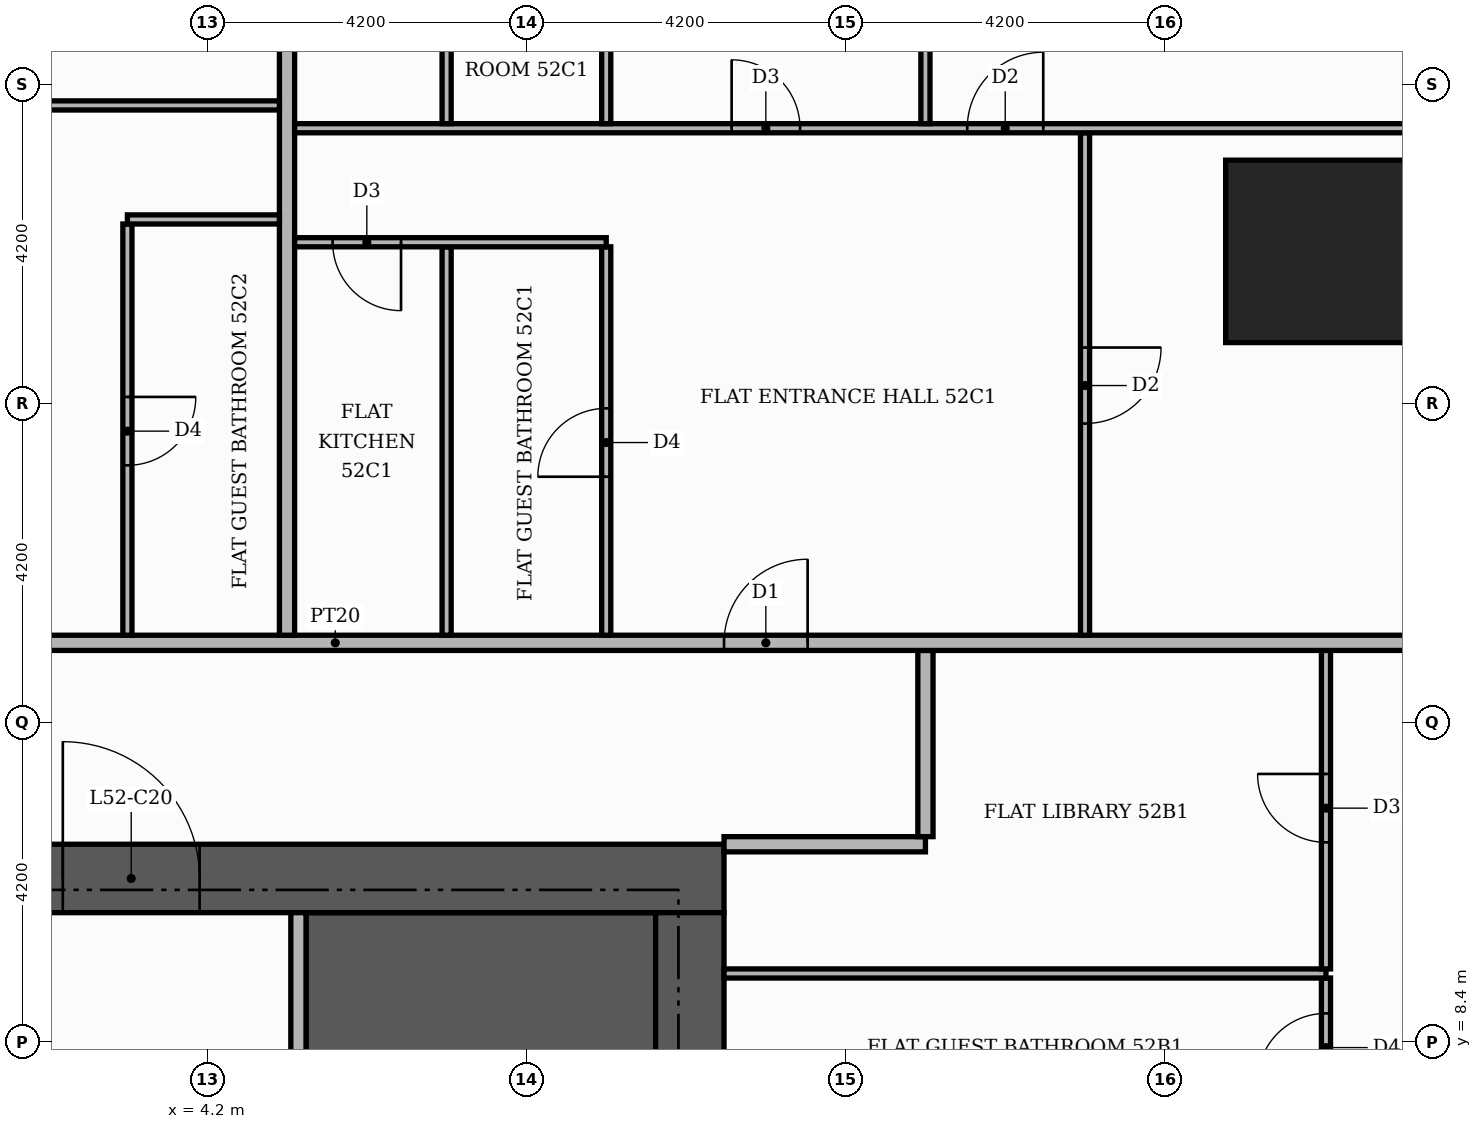
"""IFC4 building model, lengths in metres.
Left out: names, types, materials, properties, quantities, classifications, styles, units other than length and angle.
Written with IfcOpenShell. Run it as: python <this file> out.ifc"""

import sys

from ifc_helpers import new_model, si_unit, direction, frame, frame_2d, origin, origin_2d, place, context, subcontext, project, spatial, rectangle, extrude, element, fill, save


model = new_model("IFC4")
c1 = context("Model", 3, precision=1e-05, world=origin(), true_north=direction((0.0, 1.0)))
c2 = subcontext(c1, "Body", "Model", "MODEL_VIEW")
j1 = project(units=[si_unit("LENGTHUNIT", "METRE"), si_unit("PLANEANGLEUNIT", "RADIAN")], contexts=[c1])
p1 = place(None, origin())
s1 = spatial("IfcSite", under=j1, at=p1, CompositionType="ELEMENT")
p2 = place(p1, origin())
s2 = spatial("IfcBuilding", under=s1, at=p2, CompositionType="ELEMENT")
p3 = place(p2, frame((0.0, 0.0, 219.6)))
s3 = spatial("IfcBuildingStorey", under=s2, at=p3, CompositionType="ELEMENT", Elevation=219.6)
p4 = place(p3, frame((5.5, 9.15, 0.0), z_axis=(0.0, 0.0, 1.0), x_axis=(1.0, 0.0, 0.0)))
e1 = element("IfcWall", 1, at=p4, inside=s3, PredefinedType="SHEAR", context=c2, shape_type="SweptSolid", body=[
    extrude(rectangle(XDim=4.6, YDim=1.9, at=frame_2d((2.3, 0.0))), origin(), (0.0, 0.0, 1.0), 3.48),
])
p5 = place(p3, frame((-11.0, 10.55, 0.0), z_axis=(0.0, 0.0, 1.0), x_axis=(1.0, 0.0, 0.0)))
e2 = element("IfcWall", 2, at=p5, inside=s3, PredefinedType="SHEAR", context=c2, shape_type="SweptSolid", body=[
    extrude(rectangle(XDim=22.0, YDim=0.9, at=frame_2d((11.0, 0.0))), origin(), (0.0, 0.0, 1.0), 3.48),
])
p6 = place(p5, frame((13.3, 0.0, 0.0)))
e3 = element("IfcOpeningElement", 3, at=p6, cuts=e2, PredefinedType="OPENING", context=c2, shape_type="SweptSolid", body=[
    extrude(rectangle(XDim=1.8, YDim=2.2, at=frame_2d((0.9, 1.1))), frame((0.0, 0.46, 0.0), z_axis=(0.0, -1.0, 0.0), x_axis=(1.0, 0.0, 0.0)), (0.0, 0.0, 1.0), 0.92),
])
p7 = place(p3, frame((10.55, -10.1, 0.0), z_axis=(0.0, 0.0, 1.0), x_axis=(0.0, 1.0, 0.0)))
e4 = element("IfcWall", 4, at=p7, inside=s3, PredefinedType="SHEAR", context=c2, shape_type="SweptSolid", body=[
    extrude(rectangle(XDim=20.2, YDim=0.9, at=frame_2d((10.1, 0.0))), origin(), (0.0, 0.0, 1.0), 3.48),
])
p8 = place(p3, frame((18.8, 18.8, 0.0), z_axis=(0.0, 0.0, 1.0), x_axis=(1.0, 0.0, 0.0)))
e5 = element("IfcColumn", 5, at=p8, inside=s3, PredefinedType="COLUMN", context=c2, shape_type="SweptSolid", body=[
    extrude(rectangle(XDim=2.4, YDim=2.4, at=origin_2d()), origin(), (0.0, 0.0, 1.0), 3.9),
])
p9 = place(p3, frame((5.4, 5.5, 0.0), z_axis=(0.0, 0.0, 1.0), x_axis=(0.0, 1.0, 0.0)))
e6 = element("IfcWall", 6, at=p9, inside=s3, PredefinedType="PARTITIONING", context=c2, shape_type="SweptSolid", body=[
    extrude(rectangle(XDim=4.6, YDim=0.2, at=frame_2d((2.3, 0.0))), origin(), (0.0, 0.0, 1.0), 3.48),
])
p10 = place(p9, frame((0.25, 0.0, 0.0)))
e7 = element("IfcOpeningElement", 7, at=p10, cuts=e6, PredefinedType="OPENING", context=c2, shape_type="SweptSolid", body=[
    extrude(rectangle(XDim=1.0, YDim=2.1, at=frame_2d((0.5, 1.05))), frame((0.0, 0.11, 0.0), z_axis=(0.0, -1.0, 0.0), x_axis=(1.0, 0.0, 0.0)), (0.0, 0.0, 1.0), 0.22),
])
p11 = place(p3, frame((18.92, 7.41, 0.0), z_axis=(0.0, 0.0, 1.0), x_axis=(0.0, 1.0, 0.0)))
e8 = element("IfcWall", 8, at=p11, inside=s3, PredefinedType="PARTITIONING", context=c2, shape_type="SweptSolid", body=[
    extrude(rectangle(XDim=1.83, YDim=0.12, at=frame_2d((0.915, 0.0))), origin(), (0.0, 0.0, 1.0), 3.48),
])
p12 = place(p11, frame((0.465, 0.0, 0.0)))
e9 = element("IfcOpeningElement", 9, at=p12, cuts=e8, PredefinedType="OPENING", context=c2, shape_type="SweptSolid", body=[
    extrude(rectangle(XDim=0.9, YDim=2.1, at=frame_2d((0.45, 1.05))), frame((0.0, 0.07, 0.0), z_axis=(0.0, -1.0, 0.0), x_axis=(1.0, 0.0, 0.0)), (0.0, 0.0, 1.0), 0.14),
])
p13 = place(p3, frame((11.0, 9.3, 0.0), z_axis=(0.0, 0.0, 1.0), x_axis=(1.0, 0.0, 0.0)))
e10 = element("IfcWall", 10, at=p13, inside=s3, PredefinedType="PARTITIONING", context=c2, shape_type="SweptSolid", body=[
    extrude(rectangle(XDim=7.92, YDim=0.12, at=frame_2d((3.96, 0.0))), origin(), (0.0, 0.0, 1.0), 3.48),
])
p14 = place(p3, frame((18.92, 9.36, 0.0), z_axis=(0.0, 0.0, 1.0), x_axis=(0.0, 1.0, 0.0)))
e11 = element("IfcWall", 11, at=p14, inside=s3, PredefinedType="PARTITIONING", context=c2, shape_type="SweptSolid", body=[
    extrude(rectangle(XDim=4.19, YDim=0.12, at=frame_2d((2.095, 0.0))), origin(), (0.0, 0.0, 1.0), 3.48),
])
p15 = place(p14, frame((1.665, 0.0, 0.0)))
e12 = element("IfcOpeningElement", 12, at=p15, cuts=e11, PredefinedType="OPENING", context=c2, shape_type="SweptSolid", body=[
    extrude(rectangle(XDim=0.9, YDim=2.1, at=frame_2d((0.45, 1.05))), frame((0.0, 0.07, 0.0), z_axis=(0.0, -1.0, 0.0), x_axis=(1.0, 0.0, 0.0)), (0.0, 0.0, 1.0), 0.14),
])
p16 = place(p3, frame((11.0, 11.0, 0.0), z_axis=(0.0, 0.0, 1.0), x_axis=(1.0, 0.0, 0.0)))
e13 = element("IfcWall", 13, at=p16, inside=s3, PredefinedType="PARTITIONING", context=c2, shape_type="SweptSolid", body=[
    extrude(rectangle(XDim=2.65, YDim=0.2, at=frame_2d((1.325, 0.0))), origin(), (0.0, 0.0, 1.0), 3.48),
])
p17 = place(p3, frame((13.65, 11.1, 0.0), z_axis=(0.0, 0.0, 1.0), x_axis=(0.0, 1.0, 0.0)))
e14 = element("IfcWall", 14, at=p17, inside=s3, PredefinedType="PARTITIONING", context=c2, shape_type="SweptSolid", body=[
    extrude(rectangle(XDim=2.45, YDim=0.2, at=frame_2d((1.225, 0.0))), origin(), (0.0, 0.0, 1.0), 3.48),
])
p18 = place(p3, frame((-13.65, 13.65, 0.0), z_axis=(0.0, 0.0, 1.0), x_axis=(1.0, 0.0, 0.0)))
e15 = element("IfcWall", 15, at=p18, inside=s3, PredefinedType="PARTITIONING", context=c2, shape_type="SweptSolid", body=[
    extrude(rectangle(XDim=39.07, YDim=0.2, at=frame_2d((19.535, 0.0))), origin(), (0.0, 0.0, 1.0), 3.48),
])
p19 = place(p18, frame((24.65, 0.0, 0.0)))
e16 = element("IfcOpeningElement", 16, at=p19, cuts=e15, PredefinedType="OPENING", context=c2, shape_type="SweptSolid", body=[
    extrude(rectangle(XDim=1.1, YDim=2.4, at=frame_2d((0.55, 1.2))), frame((0.0, 0.11, 0.0), z_axis=(0.0, -1.0, 0.0), x_axis=(1.0, 0.0, 0.0)), (0.0, 0.0, 1.0), 0.22),
])
p20 = place(p18, frame((14.15, 0.0, 0.0)))
e17 = element("IfcOpeningElement", 17, at=p20, cuts=e15, PredefinedType="OPENING", context=c2, shape_type="SweptSolid", body=[
    extrude(rectangle(XDim=1.1, YDim=2.4, at=frame_2d((0.55, 1.2))), frame((0.0, 0.11, 0.0), z_axis=(0.0, -1.0, 0.0), x_axis=(1.0, 0.0, 0.0)), (0.0, 0.0, 1.0), 0.22),
])
p21 = place(p3, frame((3.15, 13.75, 0.0), z_axis=(0.0, 0.0, 1.0), x_axis=(0.0, 1.0, 0.0)))
e18 = element("IfcWall", 18, at=p21, inside=s3, PredefinedType="PARTITIONING", context=c2, shape_type="SweptSolid", body=[
    extrude(rectangle(XDim=5.41, YDim=0.12, at=frame_2d((2.705, 0.0))), origin(), (0.0, 0.0, 1.0), 3.48),
])
p22 = place(p21, frame((2.235, 0.0, 0.0)))
e19 = element("IfcOpeningElement", 19, at=p22, cuts=e18, PredefinedType="OPENING", context=c2, shape_type="SweptSolid", body=[
    extrude(rectangle(XDim=0.9, YDim=2.1, at=frame_2d((0.45, 1.05))), frame((0.0, 0.07, 0.0), z_axis=(0.0, -1.0, 0.0), x_axis=(1.0, 0.0, 0.0)), (0.0, 0.0, 1.0), 0.14),
])
p23 = place(p3, frame((5.25, 13.75, 0.0), z_axis=(0.0, 0.0, 1.0), x_axis=(0.0, 1.0, 0.0)))
e20 = element("IfcWall", 20, at=p23, inside=s3, PredefinedType="PARTITIONING", context=c2, shape_type="SweptSolid", body=[
    extrude(rectangle(XDim=11.67, YDim=0.2, at=frame_2d((5.835, 0.0))), origin(), (0.0, 0.0, 1.0), 3.48),
])
p24 = place(p3, frame((7.35, 13.75, 0.0), z_axis=(0.0, 0.0, 1.0), x_axis=(0.0, 1.0, 0.0)))
e21 = element("IfcWall", 21, at=p24, inside=s3, PredefinedType="PARTITIONING", context=c2, shape_type="SweptSolid", body=[
    extrude(rectangle(XDim=5.11, YDim=0.12, at=frame_2d((2.555, 0.0))), origin(), (0.0, 0.0, 1.0), 3.48),
])
p25 = place(p3, frame((9.45, 13.75, 0.0), z_axis=(0.0, 0.0, 1.0), x_axis=(0.0, 1.0, 0.0)))
e22 = element("IfcWall", 22, at=p25, inside=s3, PredefinedType="PARTITIONING", context=c2, shape_type="SweptSolid", body=[
    extrude(rectangle(XDim=5.11, YDim=0.12, at=frame_2d((2.555, 0.0))), origin(), (0.0, 0.0, 1.0), 3.48),
])
p26 = place(p25, frame((2.085, 0.0, 0.0)))
e23 = element("IfcOpeningElement", 23, at=p26, cuts=e22, PredefinedType="OPENING", context=c2, shape_type="SweptSolid", body=[
    extrude(rectangle(XDim=0.9, YDim=2.1, at=frame_2d((0.45, 1.05))), frame((0.0, 0.07, 0.0), z_axis=(0.0, -1.0, 0.0), x_axis=(1.0, 0.0, 0.0)), (0.0, 0.0, 1.0), 0.14),
])
p27 = place(p3, frame((15.75, 13.75, 0.0), z_axis=(0.0, 0.0, 1.0), x_axis=(0.0, 1.0, 0.0)))
e24 = element("IfcWall", 24, at=p27, inside=s3, PredefinedType="PARTITIONING", context=c2, shape_type="SweptSolid", body=[
    extrude(rectangle(XDim=6.61, YDim=0.12, at=frame_2d((3.305, 0.0))), origin(), (0.0, 0.0, 1.0), 3.48),
])
p28 = place(p27, frame((2.785, 0.0, 0.0)))
e25 = element("IfcOpeningElement", 25, at=p28, cuts=e24, PredefinedType="OPENING", context=c2, shape_type="SweptSolid", body=[
    extrude(rectangle(XDim=1.0, YDim=2.1, at=frame_2d((0.5, 1.05))), frame((0.0, 0.07, 0.0), z_axis=(0.0, -1.0, 0.0), x_axis=(1.0, 0.0, 0.0)), (0.0, 0.0, 1.0), 0.14),
])
p29 = place(p3, frame((5.35, 18.92, 0.0), z_axis=(0.0, 0.0, 1.0), x_axis=(1.0, 0.0, 0.0)))
e26 = element("IfcWall", 26, at=p29, inside=s3, PredefinedType="PARTITIONING", context=c2, shape_type="SweptSolid", body=[
    extrude(rectangle(XDim=4.1, YDim=0.12, at=frame_2d((2.05, 0.0))), origin(), (0.0, 0.0, 1.0), 3.48),
])
p30 = place(p29, frame((0.5, 0.0, 0.0)))
e27 = element("IfcOpeningElement", 27, at=p30, cuts=e26, PredefinedType="OPENING", context=c2, shape_type="SweptSolid", body=[
    extrude(rectangle(XDim=0.9, YDim=2.1, at=frame_2d((0.45, 1.05))), frame((0.0, 0.07, 0.0), z_axis=(0.0, -1.0, 0.0), x_axis=(1.0, 0.0, 0.0)), (0.0, 0.0, 1.0), 0.14),
])
p31 = place(p3, frame((3.15, 19.22, 0.0), z_axis=(0.0, 0.0, 1.0), x_axis=(1.0, 0.0, 0.0)))
e28 = element("IfcWall", 28, at=p31, inside=s3, PredefinedType="PARTITIONING", context=c2, shape_type="SweptSolid", body=[
    extrude(rectangle(XDim=2.0, YDim=0.12, at=frame_2d((1.0, 0.0))), origin(), (0.0, 0.0, 1.0), 3.48),
])
p32 = place(p3, frame((5.35, 20.42, 0.0), z_axis=(0.0, 0.0, 1.0), x_axis=(1.0, 0.0, 0.0)))
e29 = element("IfcWall", 29, at=p32, inside=s3, PredefinedType="PARTITIONING", context=c2, shape_type="SweptSolid", body=[
    extrude(rectangle(XDim=15.869, YDim=0.12, at=frame_2d((7.935, 0.0))), origin(), (0.0, 0.0, 1.0), 3.48),
])
p33 = place(p32, frame((8.85, 0.0, 0.0)))
e30 = element("IfcOpeningElement", 30, at=p33, cuts=e29, PredefinedType="OPENING", context=c2, shape_type="SweptSolid", body=[
    extrude(rectangle(XDim=1.0, YDim=2.1, at=frame_2d((0.5, 1.05))), frame((0.0, 0.07, 0.0), z_axis=(0.0, -1.0, 0.0), x_axis=(1.0, 0.0, 0.0)), (0.0, 0.0, 1.0), 0.14),
])
p34 = place(p32, frame((5.75, 0.0, 0.0)))
e31 = element("IfcOpeningElement", 31, at=p34, cuts=e29, PredefinedType="OPENING", context=c2, shape_type="SweptSolid", body=[
    extrude(rectangle(XDim=0.9, YDim=2.1, at=frame_2d((0.45, 1.05))), frame((0.0, 0.07, 0.0), z_axis=(0.0, -1.0, 0.0), x_axis=(1.0, 0.0, 0.0)), (0.0, 0.0, 1.0), 0.14),
])
p35 = place(p3, frame((7.35, 20.48, 0.0), z_axis=(0.0, 0.0, 1.0), x_axis=(0.0, 1.0, 0.0)))
e32 = element("IfcWall", 32, at=p35, inside=s3, PredefinedType="PARTITIONING", context=c2, shape_type="SweptSolid", body=[
    extrude(rectangle(XDim=4.94, YDim=0.12, at=frame_2d((2.47, 0.0))), origin(), (0.0, 0.0, 1.0), 3.48),
])
p36 = place(p35, frame((2.14, 0.0, 0.0)))
e33 = element("IfcOpeningElement", 33, at=p36, cuts=e32, PredefinedType="OPENING", context=c2, shape_type="SweptSolid", body=[
    extrude(rectangle(XDim=0.9, YDim=2.1, at=frame_2d((0.45, 1.05))), frame((0.0, 0.07, 0.0), z_axis=(0.0, -1.0, 0.0), x_axis=(1.0, 0.0, 0.0)), (0.0, 0.0, 1.0), 0.14),
])
p37 = place(p3, frame((9.45, 20.48, 0.0), z_axis=(0.0, 0.0, 1.0), x_axis=(0.0, 1.0, 0.0)))
e34 = element("IfcWall", 34, at=p37, inside=s3, PredefinedType="PARTITIONING", context=c2, shape_type="SweptSolid", body=[
    extrude(rectangle(XDim=4.94, YDim=0.12, at=frame_2d((2.47, 0.0))), origin(), (0.0, 0.0, 1.0), 3.48),
])
p38 = place(p37, frame((2.14, 0.0, 0.0)))
e35 = element("IfcOpeningElement", 35, at=p38, cuts=e34, PredefinedType="OPENING", context=c2, shape_type="SweptSolid", body=[
    extrude(rectangle(XDim=0.9, YDim=2.1, at=frame_2d((0.45, 1.05))), frame((0.0, 0.07, 0.0), z_axis=(0.0, -1.0, 0.0), x_axis=(1.0, 0.0, 0.0)), (0.0, 0.0, 1.0), 0.14),
])
p39 = place(p3, frame((13.65, 20.48, 0.0), z_axis=(0.0, 0.0, 1.0), x_axis=(0.0, 1.0, 0.0)))
e36 = element("IfcWall", 36, at=p39, inside=s3, PredefinedType="PARTITIONING", context=c2, shape_type="SweptSolid", body=[
    extrude(rectangle(XDim=4.94, YDim=0.12, at=frame_2d((2.47, 0.0))), origin(), (0.0, 0.0, 1.0), 3.48),
])
p40 = place(p3, frame((-13.55, 20.72, 0.0), z_axis=(0.0, 0.0, 1.0), x_axis=(1.0, 0.0, 0.0)))
e37 = element("IfcWall", 37, at=p40, inside=s3, PredefinedType="PARTITIONING", context=c2, shape_type="SweptSolid", body=[
    extrude(rectangle(XDim=18.7, YDim=0.12, at=frame_2d((9.35, 0.0))), origin(), (0.0, 0.0, 1.0), 3.48),
])
p41 = place(p40, frame((14.1, 0.0, 0.0)))
e38 = element("IfcOpeningElement", 38, at=p41, cuts=e37, PredefinedType="OPENING", context=c2, shape_type="SweptSolid", body=[
    extrude(rectangle(XDim=1.0, YDim=2.1, at=frame_2d((0.5, 1.05))), frame((0.0, 0.07, 0.0), z_axis=(0.0, -1.0, 0.0), x_axis=(1.0, 0.0, 0.0)), (0.0, 0.0, 1.0), 0.14),
])
p42 = place(p40, frame((6.8, 0.0, 0.0)))
e39 = element("IfcOpeningElement", 39, at=p42, cuts=e37, PredefinedType="OPENING", context=c2, shape_type="SweptSolid", body=[
    extrude(rectangle(XDim=0.9, YDim=2.1, at=frame_2d((0.45, 1.05))), frame((0.0, 0.07, 0.0), z_axis=(0.0, -1.0, 0.0), x_axis=(1.0, 0.0, 0.0)), (0.0, 0.0, 1.0), 0.14),
])
p43 = place(p6, origin())
e40 = element("IfcDoor", 40, at=p43, inside=s3, OperationType="DOUBLE_DOOR_SINGLE_SWING", PredefinedType="DOOR", context=c2, shape_type="SweptSolid", body=[
    extrude(rectangle(XDim=1.8, YDim=2.2, at=frame_2d((0.9, 1.1))), frame((0.0, 0.025, 0.0), z_axis=(0.0, -1.0, 0.0), x_axis=(1.0, 0.0, 0.0)), (0.0, 0.0, 1.0), 0.05),
])
fill(e3, e40)
p44 = place(p12, origin())
e41 = element("IfcDoor", 41, at=p44, inside=s3, OperationType="SINGLE_SWING_LEFT", PredefinedType="DOOR", context=c2, shape_type="SweptSolid", body=[
    extrude(rectangle(XDim=0.9, YDim=2.1, at=frame_2d((0.45, 1.05))), frame((0.0, 0.025, 0.0), z_axis=(0.0, -1.0, 0.0), x_axis=(1.0, 0.0, 0.0)), (0.0, 0.0, 1.0), 0.05),
])
fill(e9, e41)
p45 = place(p15, origin())
e42 = element("IfcDoor", 42, at=p45, inside=s3, OperationType="SINGLE_SWING_RIGHT", PredefinedType="DOOR", context=c2, shape_type="SweptSolid", body=[
    extrude(rectangle(XDim=0.9, YDim=2.1, at=frame_2d((0.45, 1.05))), frame((0.0, 0.025, 0.0), z_axis=(0.0, -1.0, 0.0), x_axis=(1.0, 0.0, 0.0)), (0.0, 0.0, 1.0), 0.05),
])
fill(e12, e42)
p46 = place(p19, origin())
e43 = element("IfcDoor", 43, at=p46, inside=s3, OperationType="SINGLE_SWING_RIGHT", PredefinedType="DOOR", context=c2, shape_type="SweptSolid", body=[
    extrude(rectangle(XDim=1.1, YDim=2.4, at=frame_2d((0.55, 1.2))), frame((0.0, 0.025, 0.0), z_axis=(0.0, -1.0, 0.0), x_axis=(1.0, 0.0, 0.0)), (0.0, 0.0, 1.0), 0.05),
])
fill(e16, e43)
p47 = place(p28, frame((1.0, 0.0, 0.0), z_axis=(0.0, 0.0, 1.0), x_axis=(-1.0, 0.0, 0.0)))
e44 = element("IfcDoor", 44, at=p47, inside=s3, OperationType="SINGLE_SWING_RIGHT", PredefinedType="DOOR", context=c2, shape_type="SweptSolid", body=[
    extrude(rectangle(XDim=1.0, YDim=2.1, at=frame_2d((0.5, 1.05))), frame((0.0, 0.025, 0.0), z_axis=(0.0, -1.0, 0.0), x_axis=(1.0, 0.0, 0.0)), (0.0, 0.0, 1.0), 0.05),
])
fill(e25, e44)
p48 = place(p26, origin())
e45 = element("IfcDoor", 45, at=p48, inside=s3, OperationType="SINGLE_SWING_LEFT", PredefinedType="DOOR", context=c2, shape_type="SweptSolid", body=[
    extrude(rectangle(XDim=0.9, YDim=2.1, at=frame_2d((0.45, 1.05))), frame((0.0, 0.025, 0.0), z_axis=(0.0, -1.0, 0.0), x_axis=(1.0, 0.0, 0.0)), (0.0, 0.0, 1.0), 0.05),
])
fill(e23, e45)
p49 = place(p30, frame((0.9, 0.0, 0.0), z_axis=(0.0, 0.0, 1.0), x_axis=(-1.0, 0.0, 0.0)))
e46 = element("IfcDoor", 46, at=p49, inside=s3, OperationType="SINGLE_SWING_RIGHT", PredefinedType="DOOR", context=c2, shape_type="SweptSolid", body=[
    extrude(rectangle(XDim=0.9, YDim=2.1, at=frame_2d((0.45, 1.05))), frame((0.0, 0.025, 0.0), z_axis=(0.0, -1.0, 0.0), x_axis=(1.0, 0.0, 0.0)), (0.0, 0.0, 1.0), 0.05),
])
fill(e27, e46)
p50 = place(p33, origin())
e47 = element("IfcDoor", 47, at=p50, inside=s3, OperationType="SINGLE_SWING_RIGHT", PredefinedType="DOOR", context=c2, shape_type="SweptSolid", body=[
    extrude(rectangle(XDim=1.0, YDim=2.1, at=frame_2d((0.5, 1.05))), frame((0.0, 0.025, 0.0), z_axis=(0.0, -1.0, 0.0), x_axis=(1.0, 0.0, 0.0)), (0.0, 0.0, 1.0), 0.05),
])
fill(e30, e47)
p51 = place(p34, origin())
e48 = element("IfcDoor", 48, at=p51, inside=s3, OperationType="SINGLE_SWING_LEFT", PredefinedType="DOOR", context=c2, shape_type="SweptSolid", body=[
    extrude(rectangle(XDim=0.9, YDim=2.1, at=frame_2d((0.45, 1.05))), frame((0.0, 0.025, 0.0), z_axis=(0.0, -1.0, 0.0), x_axis=(1.0, 0.0, 0.0)), (0.0, 0.0, 1.0), 0.05),
])
fill(e31, e48)
p52 = place(p22, frame((0.9, 0.0, 0.0), z_axis=(0.0, 0.0, 1.0), x_axis=(-1.0, 0.0, 0.0)))
e49 = element("IfcDoor", 49, at=p52, inside=s3, OperationType="SINGLE_SWING_RIGHT", PredefinedType="DOOR", context=c2, shape_type="SweptSolid", body=[
    extrude(rectangle(XDim=0.9, YDim=2.1, at=frame_2d((0.45, 1.05))), frame((0.0, 0.025, 0.0), z_axis=(0.0, -1.0, 0.0), x_axis=(1.0, 0.0, 0.0)), (0.0, 0.0, 1.0), 0.05),
])
fill(e19, e49)
save(model, sys.argv[1])
